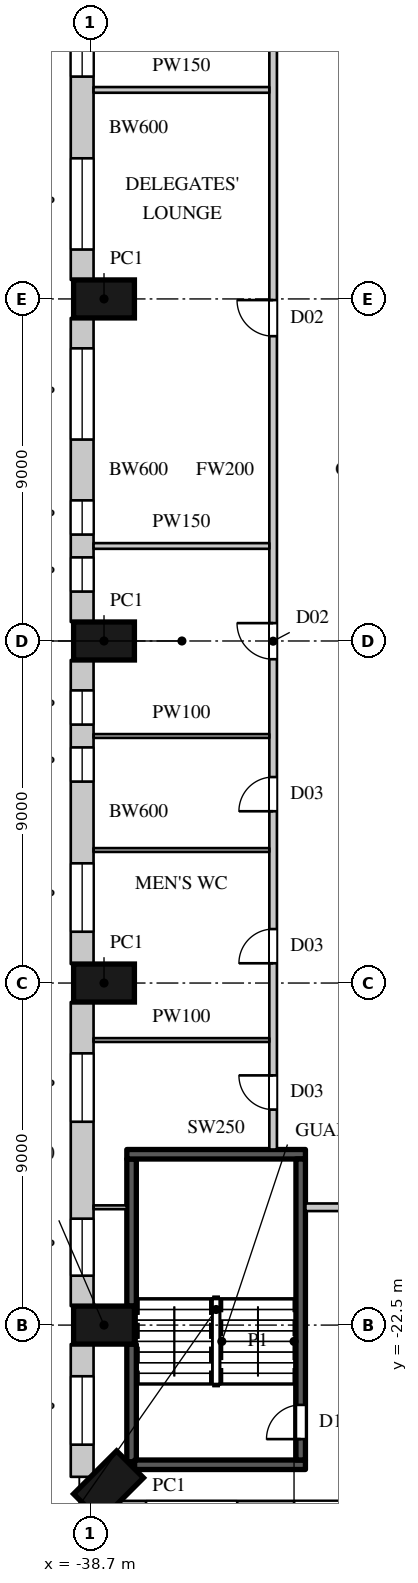
"""IFC4 building model, lengths in metres.
Left out: names, types, materials, properties, quantities, classifications, styles, units other than length and angle.
Written with IfcOpenShell. Run it as: python <this file> out.ifc"""

import sys

from ifc_helpers import new_model, si_unit, direction, frame, frame_2d, origin, origin_2d, place, context, subcontext, project, spatial, rectangle, extrude, element, fill, save


model = new_model("IFC4")
c1 = context("Model", 3, precision=1e-05, world=origin(), true_north=direction((0.0, 1.0)))
c2 = subcontext(c1, "Body", "Model", "MODEL_VIEW")
j1 = project(units=[si_unit("LENGTHUNIT", "METRE"), si_unit("PLANEANGLEUNIT", "RADIAN")], contexts=[c1])
p1 = place(None, origin())
s1 = spatial("IfcSite", under=j1, at=p1, CompositionType="ELEMENT")
p2 = place(p1, origin())
s2 = spatial("IfcBuilding", under=s1, at=p2, CompositionType="ELEMENT")
p3 = place(p2, frame((0.0, 0.0, 44.0)))
s3 = spatial("IfcBuildingStorey", under=s2, at=p3, CompositionType="ELEMENT", Elevation=44.0)
for number, where, z_axis, x_axis in (
    (1, (-38.231, -26.731, 0.0), (0.0, 0.0, 1.0), (0.707, -0.707, 0.0)),
    (2, (-38.35, 4.5, 0.0), (0.0, 0.0, 1.0), (0.0, -1.0, 0.0)),
    (3, (-38.35, -4.5, 0.0), (0.0, 0.0, 1.0), (0.0, -1.0, 0.0)),
    (4, (-38.35, -13.5, 0.0), (0.0, 0.0, 1.0), (0.0, -1.0, 0.0)),
    (5, (-38.35, -22.5, 0.0), (0.0, 0.0, 1.0), (0.0, -1.0, 0.0)),
):
    element("IfcColumn", number, at=place(p3, frame(where, z_axis=z_axis, x_axis=x_axis)), inside=s3, PredefinedType="COLUMN", context=c2, shape_type="SweptSolid", body=[
        extrude(rectangle(XDim=1.0, YDim=1.6, at=origin_2d()), origin(), (0.0, 0.0, 1.0), 6.0),
    ])
p4 = place(p3, frame((-37.993, -27.425, 0.0), z_axis=(0.0, 0.0, 1.0), x_axis=(1.0, 0.0, 0.0)))
e6 = element("IfcWall", 6, at=p4, inside=s3, PredefinedType="ELEMENTEDWALL", context=c2, shape_type="SweptSolid", body=[
    extrude(rectangle(XDim=7.793, YDim=0.6, at=frame_2d((3.896, 0.0))), origin(), (0.0, 0.0, 1.0), 5.596),
])
p5 = place(p4, frame((0.748, 0.0, 1.2)))
e7 = element("IfcOpeningElement", 7, at=p5, cuts=e6, PredefinedType="OPENING", context=c2, shape_type="SweptSolid", body=[
    extrude(rectangle(XDim=2.4, YDim=2.4, at=frame_2d((1.2, 1.2))), frame((0.0, 0.31, 0.0), z_axis=(0.0, -1.0, 0.0), x_axis=(1.0, 0.0, 0.0)), (0.0, 0.0, 1.0), 0.62),
])
p6 = place(p4, frame((4.645, 0.0, 1.2)))
e8 = element("IfcOpeningElement", 8, at=p6, cuts=e6, PredefinedType="OPENING", context=c2, shape_type="SweptSolid", body=[
    extrude(rectangle(XDim=2.4, YDim=2.4, at=frame_2d((1.2, 1.2))), frame((0.0, 0.31, 0.0), z_axis=(0.0, -1.0, 0.0), x_axis=(1.0, 0.0, 0.0)), (0.0, 0.0, 1.0), 0.62),
])
p7 = place(p3, frame((-38.925, 13.0, 0.0), z_axis=(0.0, 0.0, 1.0), x_axis=(0.0, -1.0, 0.0)))
e9 = element("IfcWall", 9, at=p7, inside=s3, PredefinedType="ELEMENTEDWALL", context=c2, shape_type="SweptSolid", body=[
    extrude(rectangle(XDim=8.0, YDim=0.6, at=frame_2d((4.0, 0.0))), origin(), (0.0, 0.0, 1.0), 5.596),
])
p8 = place(p7, frame((4.8, 0.0, 1.2)))
e10 = element("IfcOpeningElement", 10, at=p8, cuts=e9, PredefinedType="OPENING", context=c2, shape_type="SweptSolid", body=[
    extrude(rectangle(XDim=2.4, YDim=2.4, at=frame_2d((1.2, 1.2))), frame((0.0, 0.31, 0.0), z_axis=(0.0, -1.0, 0.0), x_axis=(1.0, 0.0, 0.0)), (0.0, 0.0, 1.0), 0.62),
])
p9 = place(p7, frame((0.85, 0.0, 1.2)))
e11 = element("IfcOpeningElement", 11, at=p9, cuts=e9, PredefinedType="OPENING", context=c2, shape_type="SweptSolid", body=[
    extrude(rectangle(XDim=1.8, YDim=2.4, at=frame_2d((0.9, 1.2))), frame((0.0, 0.31, 0.0), z_axis=(0.0, -1.0, 0.0), x_axis=(1.0, 0.0, 0.0)), (0.0, 0.0, 1.0), 0.62),
])
p10 = place(p3, frame((-38.925, 4.0, 0.0), z_axis=(0.0, 0.0, 1.0), x_axis=(0.0, -1.0, 0.0)))
e12 = element("IfcWall", 12, at=p10, inside=s3, PredefinedType="ELEMENTEDWALL", context=c2, shape_type="SweptSolid", body=[
    extrude(rectangle(XDim=8.0, YDim=0.6, at=frame_2d((4.0, 0.0))), origin(), (0.0, 0.0, 1.0), 5.596),
])
p11 = place(p10, frame((0.8, 0.0, 1.2)))
e13 = element("IfcOpeningElement", 13, at=p11, cuts=e12, PredefinedType="OPENING", context=c2, shape_type="SweptSolid", body=[
    extrude(rectangle(XDim=2.4, YDim=2.4, at=frame_2d((1.2, 1.2))), frame((0.0, 0.31, 0.0), z_axis=(0.0, -1.0, 0.0), x_axis=(1.0, 0.0, 0.0)), (0.0, 0.0, 1.0), 0.62),
])
p12 = place(p10, frame((4.8, 0.0, 1.2)))
e14 = element("IfcOpeningElement", 14, at=p12, cuts=e12, PredefinedType="OPENING", context=c2, shape_type="SweptSolid", body=[
    extrude(rectangle(XDim=0.9, YDim=2.4, at=frame_2d((0.45, 1.2))), frame((0.0, 0.31, 0.0), z_axis=(0.0, -1.0, 0.0), x_axis=(1.0, 0.0, 0.0)), (0.0, 0.0, 1.0), 0.62),
])
p13 = place(p10, frame((6.3, 0.0, 1.2)))
e15 = element("IfcOpeningElement", 15, at=p13, cuts=e12, PredefinedType="OPENING", context=c2, shape_type="SweptSolid", body=[
    extrude(rectangle(XDim=0.9, YDim=2.4, at=frame_2d((0.45, 1.2))), frame((0.0, 0.31, 0.0), z_axis=(0.0, -1.0, 0.0), x_axis=(1.0, 0.0, 0.0)), (0.0, 0.0, 1.0), 0.62),
])
p14 = place(p3, frame((-38.925, -5.0, 0.0), z_axis=(0.0, 0.0, 1.0), x_axis=(0.0, -1.0, 0.0)))
e16 = element("IfcWall", 16, at=p14, inside=s3, PredefinedType="ELEMENTEDWALL", context=c2, shape_type="SweptSolid", body=[
    extrude(rectangle(XDim=8.0, YDim=0.6, at=frame_2d((4.0, 0.0))), origin(), (0.0, 0.0, 1.0), 5.596),
])
p15 = place(p14, frame((0.8, 0.0, 1.2)))
e17 = element("IfcOpeningElement", 17, at=p15, cuts=e16, PredefinedType="OPENING", context=c2, shape_type="SweptSolid", body=[
    extrude(rectangle(XDim=0.9, YDim=2.4, at=frame_2d((0.45, 1.2))), frame((0.0, 0.31, 0.0), z_axis=(0.0, -1.0, 0.0), x_axis=(1.0, 0.0, 0.0)), (0.0, 0.0, 1.0), 0.62),
])
p16 = place(p14, frame((2.3, 0.0, 1.2)))
e18 = element("IfcOpeningElement", 18, at=p16, cuts=e16, PredefinedType="OPENING", context=c2, shape_type="SweptSolid", body=[
    extrude(rectangle(XDim=0.9, YDim=2.4, at=frame_2d((0.45, 1.2))), frame((0.0, 0.31, 0.0), z_axis=(0.0, -1.0, 0.0), x_axis=(1.0, 0.0, 0.0)), (0.0, 0.0, 1.0), 0.62),
])
p17 = place(p14, frame((5.35, 0.0, 1.2)))
e19 = element("IfcOpeningElement", 19, at=p17, cuts=e16, PredefinedType="OPENING", context=c2, shape_type="SweptSolid", body=[
    extrude(rectangle(XDim=1.8, YDim=2.4, at=frame_2d((0.9, 1.2))), frame((0.0, 0.31, 0.0), z_axis=(0.0, -1.0, 0.0), x_axis=(1.0, 0.0, 0.0)), (0.0, 0.0, 1.0), 0.62),
])
p18 = place(p3, frame((-38.925, -14.0, 0.0), z_axis=(0.0, 0.0, 1.0), x_axis=(0.0, -1.0, 0.0)))
e20 = element("IfcWall", 20, at=p18, inside=s3, PredefinedType="ELEMENTEDWALL", context=c2, shape_type="SweptSolid", body=[
    extrude(rectangle(XDim=8.0, YDim=0.6, at=frame_2d((4.0, 0.0))), origin(), (0.0, 0.0, 1.0), 5.596),
])
p19 = place(p18, frame((1.35, 0.0, 1.2)))
e21 = element("IfcOpeningElement", 21, at=p19, cuts=e20, PredefinedType="OPENING", context=c2, shape_type="SweptSolid", body=[
    extrude(rectangle(XDim=1.8, YDim=2.4, at=frame_2d((0.9, 1.2))), frame((0.0, 0.31, 0.0), z_axis=(0.0, -1.0, 0.0), x_axis=(1.0, 0.0, 0.0)), (0.0, 0.0, 1.0), 0.62),
])
p20 = place(p18, frame((5.7, 0.0, 1.2)))
e22 = element("IfcOpeningElement", 22, at=p20, cuts=e20, PredefinedType="OPENING", context=c2, shape_type="SweptSolid", body=[
    extrude(rectangle(XDim=1.5, YDim=2.4, at=frame_2d((0.75, 1.2))), frame((0.0, 0.31, 0.0), z_axis=(0.0, -1.0, 0.0), x_axis=(1.0, 0.0, 0.0)), (0.0, 0.0, 1.0), 0.62),
])
p21 = place(p3, frame((-38.925, -23.0, 0.0), z_axis=(0.0, 0.0, 1.0), x_axis=(0.0, -1.0, 0.0)))
e23 = element("IfcWall", 23, at=p21, inside=s3, PredefinedType="ELEMENTEDWALL", context=c2, shape_type="SweptSolid", body=[
    extrude(rectangle(XDim=3.493, YDim=0.6, at=frame_2d((1.747, 0.0))), origin(), (0.0, 0.0, 1.0), 5.596),
])
p22 = place(p21, frame((0.846, 0.0, 1.2)))
e24 = element("IfcOpeningElement", 24, at=p22, cuts=e23, PredefinedType="OPENING", context=c2, shape_type="SweptSolid", body=[
    extrude(rectangle(XDim=1.8, YDim=2.4, at=frame_2d((0.9, 1.2))), frame((0.0, 0.31, 0.0), z_axis=(0.0, -1.0, 0.0), x_axis=(1.0, 0.0, 0.0)), (0.0, 0.0, 1.0), 0.62),
])
p23 = place(p3, frame((-33.9, -17.88, 0.0), z_axis=(0.0, 0.0, 1.0), x_axis=(0.0, 1.0, 0.0)))
e25 = element("IfcWall", 25, at=p23, inside=s3, PredefinedType="PARTITIONING", context=c2, shape_type="SweptSolid", body=[
    extrude(rectangle(XDim=35.76, YDim=0.2, at=frame_2d((17.88, 0.0))), origin(), (0.0, 0.0, 1.0), 5.596),
])
p24 = place(p23, frame((1.05, 0.0, 0.0)))
e26 = element("IfcOpeningElement", 26, at=p24, cuts=e25, PredefinedType="OPENING", context=c2, shape_type="SweptSolid", body=[
    extrude(rectangle(XDim=0.9, YDim=2.2, at=frame_2d((0.45, 1.1))), frame((0.0, 0.11, 0.0), z_axis=(0.0, -1.0, 0.0), x_axis=(1.0, 0.0, 0.0)), (0.0, 0.0, 1.0), 0.22),
])
p25 = place(p23, frame((4.9, 0.0, 0.0)))
e27 = element("IfcOpeningElement", 27, at=p25, cuts=e25, PredefinedType="OPENING", context=c2, shape_type="SweptSolid", body=[
    extrude(rectangle(XDim=0.9, YDim=2.2, at=frame_2d((0.45, 1.1))), frame((0.0, 0.11, 0.0), z_axis=(0.0, -1.0, 0.0), x_axis=(1.0, 0.0, 0.0)), (0.0, 0.0, 1.0), 0.22),
])
p26 = place(p23, frame((8.9, 0.0, 0.0)))
e28 = element("IfcOpeningElement", 28, at=p26, cuts=e25, PredefinedType="OPENING", context=c2, shape_type="SweptSolid", body=[
    extrude(rectangle(XDim=0.9, YDim=2.2, at=frame_2d((0.45, 1.1))), frame((0.0, 0.11, 0.0), z_axis=(0.0, -1.0, 0.0), x_axis=(1.0, 0.0, 0.0)), (0.0, 0.0, 1.0), 0.22),
])
p27 = place(p23, frame((12.9, 0.0, 0.0)))
e29 = element("IfcOpeningElement", 29, at=p27, cuts=e25, PredefinedType="OPENING", context=c2, shape_type="SweptSolid", body=[
    extrude(rectangle(XDim=0.95, YDim=2.2, at=frame_2d((0.475, 1.1))), frame((0.0, 0.11, 0.0), z_axis=(0.0, -1.0, 0.0), x_axis=(1.0, 0.0, 0.0)), (0.0, 0.0, 1.0), 0.22),
])
p28 = place(p23, frame((21.4, 0.0, 0.0)))
e30 = element("IfcOpeningElement", 30, at=p28, cuts=e25, PredefinedType="OPENING", context=c2, shape_type="SweptSolid", body=[
    extrude(rectangle(XDim=0.95, YDim=2.2, at=frame_2d((0.475, 1.1))), frame((0.0, 0.11, 0.0), z_axis=(0.0, -1.0, 0.0), x_axis=(1.0, 0.0, 0.0)), (0.0, 0.0, 1.0), 0.22),
])
p29 = place(p23, frame((31.25, 0.0, 0.0)))
e31 = element("IfcOpeningElement", 31, at=p29, cuts=e25, PredefinedType="OPENING", context=c2, shape_type="SweptSolid", body=[
    extrude(rectangle(XDim=0.95, YDim=2.2, at=frame_2d((0.475, 1.1))), frame((0.0, 0.11, 0.0), z_axis=(0.0, -1.0, 0.0), x_axis=(1.0, 0.0, 0.0)), (0.0, 0.0, 1.0), 0.22),
])
p30 = place(p3, frame((-33.05, -19.4, 0.0), z_axis=(0.0, 0.0, 1.0), x_axis=(1.0, 0.0, 0.0)))
e32 = element("IfcWall", 32, at=p30, inside=s3, PredefinedType="PARTITIONING", context=c2, shape_type="SweptSolid", body=[
    extrude(rectangle(XDim=2.913, YDim=0.2, at=frame_2d((1.457, 0.0))), origin(), (0.0, 0.0, 1.0), 5.596),
])
p31 = place(p30, frame((0.95, 0.0, 0.0)))
e33 = element("IfcOpeningElement", 33, at=p31, cuts=e32, PredefinedType="OPENING", context=c2, shape_type="SweptSolid", body=[
    extrude(rectangle(XDim=0.95, YDim=2.2, at=frame_2d((0.475, 1.1))), frame((0.0, 0.11, 0.0), z_axis=(0.0, -1.0, 0.0), x_axis=(1.0, 0.0, 0.0)), (0.0, 0.0, 1.0), 0.22),
])
for number, where, z_axis, x_axis in (
    (34, (-38.625, -2.0, 0.0), (0.0, 0.0, 1.0), (1.0, 0.0, 0.0)),
    (35, (-38.625, 10.0, 0.0), (0.0, 0.0, 1.0), (1.0, 0.0, 0.0)),
):
    element("IfcWall", number, at=place(p3, frame(where, z_axis=z_axis, x_axis=x_axis)), inside=s3, PredefinedType="PARTITIONING", context=c2, shape_type="SweptSolid", body=[
        extrude(rectangle(XDim=4.625, YDim=0.15, at=frame_2d((2.312, 0.0))), origin(), (0.0, 0.0, 1.0), 5.596),
    ])
p32 = place(p3, frame((-37.625, -26.095, 0.0), z_axis=(0.0, 0.0, 1.0), x_axis=(0.0, 1.0, 0.0)))
e36 = element("IfcWall", 36, at=p32, inside=s3, PredefinedType="SHEAR", context=c2, shape_type="SweptSolid", body=[
    extrude(rectangle(XDim=3.095, YDim=0.25, at=frame_2d((1.548, 0.0))), origin(), (0.0, 0.0, 1.0), 5.596),
])
p33 = place(p3, frame((-37.625, -22.0, 0.0), z_axis=(0.0, 0.0, 1.0), x_axis=(0.0, 1.0, 0.0)))
e37 = element("IfcWall", 37, at=p33, inside=s3, PredefinedType="SHEAR", context=c2, shape_type="SweptSolid", body=[
    extrude(rectangle(XDim=3.87, YDim=0.25, at=frame_2d((1.935, 0.0))), origin(), (0.0, 0.0, 1.0), 5.596),
])
p34 = place(p3, frame((-37.545, -26.175, 0.0), z_axis=(0.0, 0.0, 1.0), x_axis=(1.0, 0.0, 0.0)))
e38 = element("IfcWall", 38, at=p34, inside=s3, PredefinedType="SHEAR", context=c2, shape_type="SweptSolid", body=[
    extrude(rectangle(XDim=4.495, YDim=0.25, at=frame_2d((2.248, 0.0))), origin(), (0.0, 0.0, 1.0), 5.596),
])
p35 = place(p3, frame((-37.75, -18.005, 0.0), z_axis=(0.0, 0.0, 1.0), x_axis=(1.0, 0.0, 0.0)))
e39 = element("IfcWall", 39, at=p35, inside=s3, PredefinedType="SHEAR", context=c2, shape_type="SweptSolid", body=[
    extrude(rectangle(XDim=4.7, YDim=0.25, at=frame_2d((2.35, 0.0))), origin(), (0.0, 0.0, 1.0), 5.596),
])
p36 = place(p3, frame((-33.175, -26.05, 0.0), z_axis=(0.0, 0.0, 1.0), x_axis=(0.0, 1.0, 0.0)))
e40 = element("IfcWall", 40, at=p36, inside=s3, PredefinedType="SHEAR", context=c2, shape_type="SweptSolid", body=[
    extrude(rectangle(XDim=7.92, YDim=0.25, at=frame_2d((3.96, 0.0))), origin(), (0.0, 0.0, 1.0), 5.596),
])
p37 = place(p36, frame((0.55, 0.0, 0.0)))
e41 = element("IfcOpeningElement", 41, at=p37, cuts=e40, PredefinedType="OPENING", context=c2, shape_type="SweptSolid", body=[
    extrude(rectangle(XDim=0.9, YDim=2.2, at=frame_2d((0.45, 1.1))), frame((0.0, 0.135, 0.0), z_axis=(0.0, -1.0, 0.0), x_axis=(1.0, 0.0, 0.0)), (0.0, 0.0, 1.0), 0.27),
])
p38 = place(p3, frame((-38.625, -19.4, 0.0), z_axis=(0.0, 0.0, 1.0), x_axis=(1.0, 0.0, 0.0)))
e42 = element("IfcWall", 42, at=p38, inside=s3, PredefinedType="PARTITIONING", context=c2, shape_type="SweptSolid", body=[
    extrude(rectangle(XDim=0.875, YDim=0.1, at=frame_2d((0.438, 0.0))), origin(), (0.0, 0.0, 1.0), 5.596),
])
for number, where, z_axis, x_axis in (
    (43, (-38.625, -15.0, 0.0), (0.0, 0.0, 1.0), (1.0, 0.0, 0.0)),
    (44, (-38.625, -10.0, 0.0), (0.0, 0.0, 1.0), (1.0, 0.0, 0.0)),
    (45, (-38.625, -7.0, 0.0), (0.0, 0.0, 1.0), (1.0, 0.0, 0.0)),
):
    element("IfcWall", number, at=place(p3, frame(where, z_axis=z_axis, x_axis=x_axis)), inside=s3, PredefinedType="PARTITIONING", context=c2, shape_type="SweptSolid", body=[
        extrude(rectangle(XDim=4.625, YDim=0.1, at=frame_2d((2.312, 0.0))), origin(), (0.0, 0.0, 1.0), 5.596),
    ])
p39 = place(p8, origin())
e46 = element("IfcWindow", 46, at=p39, inside=s3, PartitioningType="SINGLE_PANEL", PredefinedType="WINDOW", context=c2, shape_type="SweptSolid", body=[
    extrude(rectangle(XDim=2.4, YDim=2.4, at=frame_2d((1.2, 1.2))), frame((0.0, 0.06, 0.0), z_axis=(0.0, -1.0, 0.0), x_axis=(1.0, 0.0, 0.0)), (0.0, 0.0, 1.0), 0.06),
])
fill(e10, e46)
p40 = place(p11, origin())
e47 = element("IfcWindow", 47, at=p40, inside=s3, PartitioningType="SINGLE_PANEL", PredefinedType="WINDOW", context=c2, shape_type="SweptSolid", body=[
    extrude(rectangle(XDim=2.4, YDim=2.4, at=frame_2d((1.2, 1.2))), frame((0.0, 0.06, 0.0), z_axis=(0.0, -1.0, 0.0), x_axis=(1.0, 0.0, 0.0)), (0.0, 0.0, 1.0), 0.06),
])
fill(e13, e47)
p41 = place(p22, origin())
e48 = element("IfcWindow", 48, at=p41, inside=s3, PartitioningType="SINGLE_PANEL", PredefinedType="WINDOW", context=c2, shape_type="SweptSolid", body=[
    extrude(rectangle(XDim=1.8, YDim=2.4, at=frame_2d((0.9, 1.2))), frame((0.0, 0.06, 0.0), z_axis=(0.0, -1.0, 0.0), x_axis=(1.0, 0.0, 0.0)), (0.0, 0.0, 1.0), 0.06),
])
fill(e24, e48)
p42 = place(p24, origin())
e49 = element("IfcDoor", 49, at=p42, inside=s3, OperationType="SINGLE_SWING_RIGHT", PredefinedType="DOOR", context=c2, shape_type="SweptSolid", body=[
    extrude(rectangle(XDim=0.9, YDim=2.2, at=frame_2d((0.45, 1.1))), frame((0.0, 0.025, 0.0), z_axis=(0.0, -1.0, 0.0), x_axis=(1.0, 0.0, 0.0)), (0.0, 0.0, 1.0), 0.05),
])
fill(e26, e49)
p43 = place(p25, origin())
e50 = element("IfcDoor", 50, at=p43, inside=s3, OperationType="SINGLE_SWING_LEFT", PredefinedType="DOOR", context=c2, shape_type="SweptSolid", body=[
    extrude(rectangle(XDim=0.9, YDim=2.2, at=frame_2d((0.45, 1.1))), frame((0.0, 0.025, 0.0), z_axis=(0.0, -1.0, 0.0), x_axis=(1.0, 0.0, 0.0)), (0.0, 0.0, 1.0), 0.05),
])
fill(e27, e50)
p44 = place(p26, origin())
e51 = element("IfcDoor", 51, at=p44, inside=s3, OperationType="SINGLE_SWING_LEFT", PredefinedType="DOOR", context=c2, shape_type="SweptSolid", body=[
    extrude(rectangle(XDim=0.9, YDim=2.2, at=frame_2d((0.45, 1.1))), frame((0.0, 0.025, 0.0), z_axis=(0.0, -1.0, 0.0), x_axis=(1.0, 0.0, 0.0)), (0.0, 0.0, 1.0), 0.05),
])
fill(e28, e51)
p45 = place(p27, origin())
e52 = element("IfcDoor", 52, at=p45, inside=s3, OperationType="SINGLE_SWING_RIGHT", PredefinedType="DOOR", context=c2, shape_type="SweptSolid", body=[
    extrude(rectangle(XDim=0.95, YDim=2.2, at=frame_2d((0.475, 1.1))), frame((0.0, 0.025, 0.0), z_axis=(0.0, -1.0, 0.0), x_axis=(1.0, 0.0, 0.0)), (0.0, 0.0, 1.0), 0.05),
])
fill(e29, e52)
p46 = place(p28, origin())
e53 = element("IfcDoor", 53, at=p46, inside=s3, OperationType="SINGLE_SWING_RIGHT", PredefinedType="DOOR", context=c2, shape_type="SweptSolid", body=[
    extrude(rectangle(XDim=0.95, YDim=2.2, at=frame_2d((0.475, 1.1))), frame((0.0, 0.025, 0.0), z_axis=(0.0, -1.0, 0.0), x_axis=(1.0, 0.0, 0.0)), (0.0, 0.0, 1.0), 0.05),
])
fill(e30, e53)
p47 = place(p37, origin())
e54 = element("IfcDoor", 54, at=p47, inside=s3, OperationType="SINGLE_SWING_LEFT", PredefinedType="DOOR", context=c2, shape_type="SweptSolid", body=[
    extrude(rectangle(XDim=0.9, YDim=2.2, at=frame_2d((0.45, 1.1))), frame((0.0, 0.025, 0.0), z_axis=(0.0, -1.0, 0.0), x_axis=(1.0, 0.0, 0.0)), (0.0, 0.0, 1.0), 0.05),
])
fill(e41, e54)
p48 = place(p9, origin())
e55 = element("IfcWindow", 55, at=p48, inside=s3, PartitioningType="SINGLE_PANEL", PredefinedType="WINDOW", context=c2, shape_type="SweptSolid", body=[
    extrude(rectangle(XDim=1.8, YDim=2.4, at=frame_2d((0.9, 1.2))), frame((0.0, 0.06, 0.0), z_axis=(0.0, -1.0, 0.0), x_axis=(1.0, 0.0, 0.0)), (0.0, 0.0, 1.0), 0.06),
])
fill(e11, e55)
p49 = place(p12, origin())
e56 = element("IfcWindow", 56, at=p49, inside=s3, PartitioningType="SINGLE_PANEL", PredefinedType="WINDOW", context=c2, shape_type="SweptSolid", body=[
    extrude(rectangle(XDim=0.9, YDim=2.4, at=frame_2d((0.45, 1.2))), frame((0.0, 0.06, 0.0), z_axis=(0.0, -1.0, 0.0), x_axis=(1.0, 0.0, 0.0)), (0.0, 0.0, 1.0), 0.06),
])
fill(e14, e56)
p50 = place(p13, origin())
e57 = element("IfcWindow", 57, at=p50, inside=s3, PartitioningType="SINGLE_PANEL", PredefinedType="WINDOW", context=c2, shape_type="SweptSolid", body=[
    extrude(rectangle(XDim=0.9, YDim=2.4, at=frame_2d((0.45, 1.2))), frame((0.0, 0.06, 0.0), z_axis=(0.0, -1.0, 0.0), x_axis=(1.0, 0.0, 0.0)), (0.0, 0.0, 1.0), 0.06),
])
fill(e15, e57)
p51 = place(p15, origin())
e58 = element("IfcWindow", 58, at=p51, inside=s3, PartitioningType="SINGLE_PANEL", PredefinedType="WINDOW", context=c2, shape_type="SweptSolid", body=[
    extrude(rectangle(XDim=0.9, YDim=2.4, at=frame_2d((0.45, 1.2))), frame((0.0, 0.06, 0.0), z_axis=(0.0, -1.0, 0.0), x_axis=(1.0, 0.0, 0.0)), (0.0, 0.0, 1.0), 0.06),
])
fill(e17, e58)
p52 = place(p16, origin())
e59 = element("IfcWindow", 59, at=p52, inside=s3, PartitioningType="SINGLE_PANEL", PredefinedType="WINDOW", context=c2, shape_type="SweptSolid", body=[
    extrude(rectangle(XDim=0.9, YDim=2.4, at=frame_2d((0.45, 1.2))), frame((0.0, 0.06, 0.0), z_axis=(0.0, -1.0, 0.0), x_axis=(1.0, 0.0, 0.0)), (0.0, 0.0, 1.0), 0.06),
])
fill(e18, e59)
p53 = place(p17, origin())
e60 = element("IfcWindow", 60, at=p53, inside=s3, PartitioningType="SINGLE_PANEL", PredefinedType="WINDOW", context=c2, shape_type="SweptSolid", body=[
    extrude(rectangle(XDim=1.8, YDim=2.4, at=frame_2d((0.9, 1.2))), frame((0.0, 0.06, 0.0), z_axis=(0.0, -1.0, 0.0), x_axis=(1.0, 0.0, 0.0)), (0.0, 0.0, 1.0), 0.06),
])
fill(e19, e60)
p54 = place(p19, origin())
e61 = element("IfcWindow", 61, at=p54, inside=s3, PartitioningType="SINGLE_PANEL", PredefinedType="WINDOW", context=c2, shape_type="SweptSolid", body=[
    extrude(rectangle(XDim=1.8, YDim=2.4, at=frame_2d((0.9, 1.2))), frame((0.0, 0.06, 0.0), z_axis=(0.0, -1.0, 0.0), x_axis=(1.0, 0.0, 0.0)), (0.0, 0.0, 1.0), 0.06),
])
fill(e21, e61)
p55 = place(p20, origin())
e62 = element("IfcWindow", 62, at=p55, inside=s3, PartitioningType="SINGLE_PANEL", PredefinedType="WINDOW", context=c2, shape_type="SweptSolid", body=[
    extrude(rectangle(XDim=1.5, YDim=2.4, at=frame_2d((0.75, 1.2))), frame((0.0, 0.06, 0.0), z_axis=(0.0, -1.0, 0.0), x_axis=(1.0, 0.0, 0.0)), (0.0, 0.0, 1.0), 0.06),
])
fill(e22, e62)
save(model, sys.argv[1])
